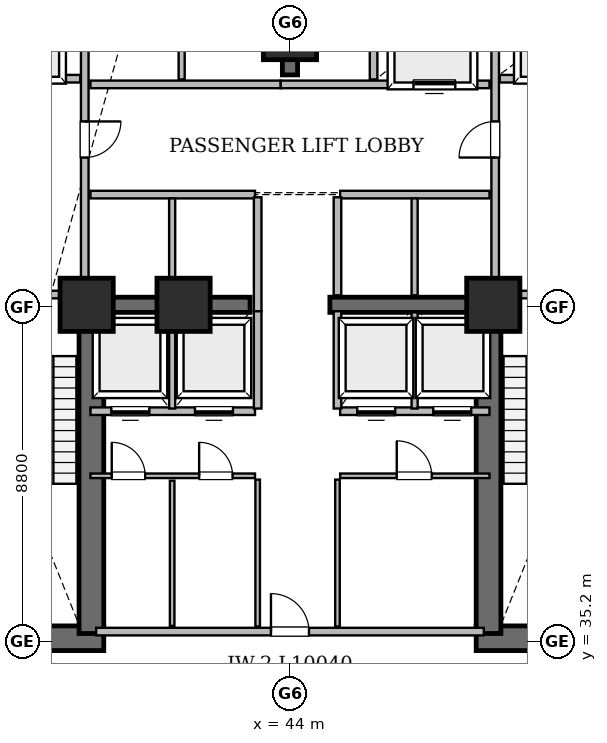
"""IFC4 building model, lengths in metres.
Left out: names, types, materials, properties, quantities, classifications, styles, units other than length and angle.
Written with IfcOpenShell. Run it as: python <this file> out.ifc"""

import sys

from ifc_helpers import new_model, si_unit, direction, frame, frame_2d, origin, origin_2d, place, context, subcontext, project, spatial, rectangle, extrude, element, fill, save


model = new_model("IFC4")
c1 = context("Model", 3, precision=1e-05, world=origin(), true_north=direction((0.0, 1.0)))
c2 = subcontext(c1, "Body", "Model", "MODEL_VIEW")
j1 = project(units=[si_unit("LENGTHUNIT", "METRE"), si_unit("PLANEANGLEUNIT", "RADIAN")], contexts=[c1])
p1 = place(None, origin())
s1 = spatial("IfcSite", under=j1, at=p1, CompositionType="ELEMENT")
p2 = place(p1, origin())
s2 = spatial("IfcBuilding", under=s1, at=p2, CompositionType="ELEMENT")
p3 = place(p2, frame((0.0, 0.0, 4.8)))
s3 = spatial("IfcBuildingStorey", under=s2, at=p3, CompositionType="ELEMENT", Elevation=4.8)
for number, where, z_axis, x_axis in (
    (1, (34.95, 35.275, 0.0), (0.0, 0.0, 1.0), (1.0, 0.0, 0.0)),
    (2, (48.9, 35.275, 0.0), (0.0, 0.0, 1.0), (1.0, 0.0, 0.0)),
):
    element("IfcWall", number, at=place(p3, frame(where, z_axis=z_axis, x_axis=x_axis)), inside=s3, PredefinedType="SHEAR", context=c2, shape_type="SweptSolid", body=[
        extrude(rectangle(XDim=4.15, YDim=0.65, at=frame_2d((2.075, 0.0))), origin(), (0.0, 0.0, 1.0), 4.5),
    ])
for number, where, z_axis, x_axis in (
    (3, (38.775, 35.4, 0.0), (0.0, 0.0, 1.0), (0.0, 1.0, 0.0)),
    (4, (49.225, 35.4, 0.0), (0.0, 0.0, 1.0), (0.0, 1.0, 0.0)),
):
    element("IfcWall", number, at=place(p3, frame(where, z_axis=z_axis, x_axis=x_axis)), inside=s3, PredefinedType="SHEAR", context=c2, shape_type="SweptSolid", body=[
        extrude(rectangle(XDim=8.95, YDim=0.65, at=frame_2d((4.475, 0.0))), origin(), (0.0, 0.0, 1.0), 4.5),
    ])
p4 = place(p3, frame((44.0, 50.1, 0.0), z_axis=(0.0, 0.0, 1.0), x_axis=(0.0, 1.0, 0.0)))
e5 = element("IfcWall", 5, at=p4, inside=s3, PredefinedType="SHEAR", context=c2, shape_type="SweptSolid", body=[
    extrude(rectangle(XDim=2.1, YDim=0.4, at=frame_2d((1.05, 0.0))), origin(), (0.0, 0.0, 1.0), 4.5),
])
for number, where, z_axis, x_axis in (
    (6, (38.75, 44.05, 0.0), (0.0, 0.0, 1.0), (1.0, 0.0, 0.0)),
    (7, (45.05, 44.05, 0.0), (0.0, 0.0, 1.0), (1.0, 0.0, 0.0)),
):
    element("IfcWall", number, at=place(p3, frame(where, z_axis=z_axis, x_axis=x_axis)), inside=s3, PredefinedType="SHEAR", context=c2, shape_type="SweptSolid", body=[
        extrude(rectangle(XDim=4.2, YDim=0.4, at=frame_2d((2.1, 0.0))), origin(), (0.0, 0.0, 1.0), 4.5),
    ])
for number, where, z_axis, x_axis in (
    (8, (38.65, 44.05, 0.0), (0.0, 0.0, 1.0), (1.0, 0.0, 0.0)),
    (9, (49.35, 44.05, 0.0), (0.0, 0.0, 1.0), (1.0, 0.0, 0.0)),
    (10, (44.0, 51.2, 0.0), (0.0, 0.0, 1.0), (1.0, 0.0, 0.0)),
    (11, (41.2, 44.05, 0.0), (0.0, 0.0, 1.0), (1.0, 0.0, 0.0)),
):
    element("IfcColumn", number, at=place(p3, frame(where, z_axis=z_axis, x_axis=x_axis)), inside=s3, PredefinedType="COLUMN", context=c2, shape_type="SweptSolid", body=[
        extrude(rectangle(XDim=1.4, YDim=1.4, at=origin_2d()), origin(), (0.0, 0.0, 1.0), 4.8),
    ])
p5 = place(p3, frame((38.9, 35.45, 0.0), z_axis=(0.0, 0.0, 1.0), x_axis=(1.0, 0.0, 0.0)))
e12 = element("IfcWall", 12, at=p5, inside=s3, PredefinedType="SOLIDWALL", context=c2, shape_type="SweptSolid", body=[
    extrude(rectangle(XDim=10.2, YDim=0.2, at=frame_2d((5.1, 0.0))), origin(), (0.0, 0.0, 1.0), 4.5),
])
p6 = place(p5, frame((4.6, 0.0, 0.0)))
e13 = element("IfcOpeningElement", 13, at=p6, cuts=e12, PredefinedType="OPENING", context=c2, shape_type="SweptSolid", body=[
    extrude(rectangle(XDim=1.0, YDim=2.15, at=frame_2d((0.5, 1.075))), frame((0.0, 0.11, 0.0), z_axis=(0.0, -1.0, 0.0), x_axis=(1.0, 0.0, 0.0)), (0.0, 0.0, 1.0), 0.22),
])
p7 = place(p3, frame((38.6, 44.5, 0.0), z_axis=(0.0, 0.0, 1.0), x_axis=(0.0, 1.0, 0.0)))
e14 = element("IfcWall", 14, at=p7, inside=s3, PredefinedType="SOLIDWALL", context=c2, shape_type="SweptSolid", body=[
    extrude(rectangle(XDim=7.92, YDim=0.2, at=frame_2d((3.96, 0.0))), origin(), (0.0, 0.0, 1.0), 4.5),
])
p8 = place(p7, frame((3.425, 0.0, 0.0)))
e15 = element("IfcOpeningElement", 15, at=p8, cuts=e14, PredefinedType="OPENING", context=c2, shape_type="SweptSolid", body=[
    extrude(rectangle(XDim=0.95, YDim=2.15, at=frame_2d((0.475, 1.075))), frame((0.0, 0.11, 0.0), z_axis=(0.0, -1.0, 0.0), x_axis=(1.0, 0.0, 0.0)), (0.0, 0.0, 1.0), 0.22),
])
p9 = place(p3, frame((49.4, 44.5, 0.0), z_axis=(0.0, 0.0, 1.0), x_axis=(0.0, 1.0, 0.0)))
e16 = element("IfcWall", 16, at=p9, inside=s3, PredefinedType="SOLIDWALL", context=c2, shape_type="SweptSolid", body=[
    extrude(rectangle(XDim=7.92, YDim=0.2, at=frame_2d((3.96, 0.0))), origin(), (0.0, 0.0, 1.0), 3.588),
])
p10 = place(p9, frame((3.425, 0.0, 0.0)))
e17 = element("IfcOpeningElement", 17, at=p10, cuts=e16, PredefinedType="OPENING", context=c2, shape_type="SweptSolid", body=[
    extrude(rectangle(XDim=0.95, YDim=2.15, at=frame_2d((0.475, 1.075))), frame((0.0, 0.11, 0.0), z_axis=(0.0, -1.0, 0.0), x_axis=(1.0, 0.0, 0.0)), (0.0, 0.0, 1.0), 0.22),
])
p11 = place(p3, frame((43.75, 49.85, 0.0), z_axis=(0.0, 0.0, 1.0), x_axis=(1.0, 0.0, 0.0)))
e18 = element("IfcWall", 18, at=p11, inside=s3, PredefinedType="SOLIDWALL", context=c2, shape_type="SweptSolid", body=[
    extrude(rectangle(XDim=5.5, YDim=0.2, at=frame_2d((2.75, 0.0))), origin(), (0.0, 0.0, 1.0), 3.588),
])
p12 = place(p11, frame((3.5, 0.0, 0.0)))
e19 = element("IfcOpeningElement", 19, at=p12, cuts=e18, PredefinedType="OPENING", context=c2, shape_type="SweptSolid", body=[
    extrude(rectangle(XDim=1.1, YDim=2.15, at=frame_2d((0.55, 1.075))), frame((0.0, 0.11, 0.0), z_axis=(0.0, -1.0, 0.0), x_axis=(1.0, 0.0, 0.0)), (0.0, 0.0, 1.0), 0.22),
])
p13 = place(p3, frame((38.75, 41.25, 0.0), z_axis=(0.0, 0.0, 1.0), x_axis=(1.0, 0.0, 0.0)))
e20 = element("IfcWall", 20, at=p13, inside=s3, PredefinedType="SOLIDWALL", context=c2, shape_type="SweptSolid", body=[
    extrude(rectangle(XDim=4.33, YDim=0.2, at=frame_2d((2.165, 0.0))), origin(), (0.0, 0.0, 1.0), 4.5),
])
p14 = place(p13, frame((0.55, 0.0, 0.0)))
e21 = element("IfcOpeningElement", 21, at=p14, cuts=e20, PredefinedType="OPENING", context=c2, shape_type="SweptSolid", body=[
    extrude(rectangle(XDim=1.0, YDim=2.15, at=frame_2d((0.5, 1.075))), frame((0.0, 0.11, 0.0), z_axis=(0.0, -1.0, 0.0), x_axis=(1.0, 0.0, 0.0)), (0.0, 0.0, 1.0), 0.22),
])
p15 = place(p13, frame((2.75, 0.0, 0.0)))
e22 = element("IfcOpeningElement", 22, at=p15, cuts=e20, PredefinedType="OPENING", context=c2, shape_type="SweptSolid", body=[
    extrude(rectangle(XDim=1.0, YDim=2.15, at=frame_2d((0.5, 1.075))), frame((0.0, 0.11, 0.0), z_axis=(0.0, -1.0, 0.0), x_axis=(1.0, 0.0, 0.0)), (0.0, 0.0, 1.0), 0.22),
])
p16 = place(p3, frame((38.75, 39.55, 0.0), z_axis=(0.0, 0.0, 1.0), x_axis=(1.0, 0.0, 0.0)))
e23 = element("IfcWall", 23, at=p16, inside=s3, PredefinedType="PARTITIONING", context=c2, shape_type="SweptSolid", body=[
    extrude(rectangle(XDim=4.33, YDim=0.12, at=frame_2d((2.165, 0.0))), origin(), (0.0, 0.0, 1.0), 4.5),
])
p17 = place(p16, frame((0.56, 0.0, 0.0)))
e24 = element("IfcOpeningElement", 24, at=p17, cuts=e23, PredefinedType="OPENING", context=c2, shape_type="SweptSolid", body=[
    extrude(rectangle(XDim=0.88, YDim=2.1, at=frame_2d((0.44, 1.05))), frame((0.0, 0.07, 0.0), z_axis=(0.0, -1.0, 0.0), x_axis=(1.0, 0.0, 0.0)), (0.0, 0.0, 1.0), 0.14),
])
p18 = place(p16, frame((2.86, 0.0, 0.0)))
e25 = element("IfcOpeningElement", 25, at=p18, cuts=e23, PredefinedType="OPENING", context=c2, shape_type="SweptSolid", body=[
    extrude(rectangle(XDim=0.88, YDim=2.1, at=frame_2d((0.44, 1.05))), frame((0.0, 0.07, 0.0), z_axis=(0.0, -1.0, 0.0), x_axis=(1.0, 0.0, 0.0)), (0.0, 0.0, 1.0), 0.14),
])
p19 = place(p3, frame((45.32, 41.25, 0.0), z_axis=(0.0, 0.0, 1.0), x_axis=(1.0, 0.0, 0.0)))
e26 = element("IfcWall", 26, at=p19, inside=s3, PredefinedType="SOLIDWALL", context=c2, shape_type="SweptSolid", body=[
    extrude(rectangle(XDim=3.93, YDim=0.2, at=frame_2d((1.965, 0.0))), origin(), (0.0, 0.0, 1.0), 4.5),
])
p20 = place(p19, frame((0.45, 0.0, 0.0)))
e27 = element("IfcOpeningElement", 27, at=p20, cuts=e26, PredefinedType="OPENING", context=c2, shape_type="SweptSolid", body=[
    extrude(rectangle(XDim=1.0, YDim=2.15, at=frame_2d((0.5, 1.075))), frame((0.0, 0.11, 0.0), z_axis=(0.0, -1.0, 0.0), x_axis=(1.0, 0.0, 0.0)), (0.0, 0.0, 1.0), 0.22),
])
p21 = place(p19, frame((2.45, 0.0, 0.0)))
e28 = element("IfcOpeningElement", 28, at=p21, cuts=e26, PredefinedType="OPENING", context=c2, shape_type="SweptSolid", body=[
    extrude(rectangle(XDim=1.0, YDim=2.15, at=frame_2d((0.5, 1.075))), frame((0.0, 0.11, 0.0), z_axis=(0.0, -1.0, 0.0), x_axis=(1.0, 0.0, 0.0)), (0.0, 0.0, 1.0), 0.22),
])
p22 = place(p3, frame((45.32, 39.55, 0.0), z_axis=(0.0, 0.0, 1.0), x_axis=(1.0, 0.0, 0.0)))
e29 = element("IfcWall", 29, at=p22, inside=s3, PredefinedType="PARTITIONING", context=c2, shape_type="SweptSolid", body=[
    extrude(rectangle(XDim=3.93, YDim=0.12, at=frame_2d((1.965, 0.0))), origin(), (0.0, 0.0, 1.0), 4.5),
])
p23 = place(p22, frame((1.49, 0.0, 0.0)))
e30 = element("IfcOpeningElement", 30, at=p23, cuts=e29, PredefinedType="OPENING", context=c2, shape_type="SweptSolid", body=[
    extrude(rectangle(XDim=0.92, YDim=2.1, at=frame_2d((0.46, 1.05))), frame((0.0, 0.07, 0.0), z_axis=(0.0, -1.0, 0.0), x_axis=(1.0, 0.0, 0.0)), (0.0, 0.0, 1.0), 0.14),
])
p24 = place(p3, frame((35.65, 44.32, 0.0), z_axis=(0.0, 0.0, 1.0), x_axis=(1.0, 0.0, 0.0)))
e31 = element("IfcWall", 31, at=p24, inside=s3, PredefinedType="SOLIDWALL", context=c2, shape_type="SweptSolid", body=[
    extrude(rectangle(XDim=2.8, YDim=0.2, at=frame_2d((1.4, 0.0))), origin(), (0.0, 0.0, 1.0), 4.5),
])
p25 = place(p24, frame((0.9, 0.0, 0.0)))
e32 = element("IfcOpeningElement", 32, at=p25, cuts=e31, PredefinedType="OPENING", context=c2, shape_type="SweptSolid", body=[
    extrude(rectangle(XDim=1.0, YDim=2.15, at=frame_2d((0.5, 1.075))), frame((0.0, 0.11, 0.0), z_axis=(0.0, -1.0, 0.0), x_axis=(1.0, 0.0, 0.0)), (0.0, 0.0, 1.0), 0.22),
])
p26 = place(p3, frame((49.55, 44.32, 0.0), z_axis=(0.0, 0.0, 1.0), x_axis=(1.0, 0.0, 0.0)))
e33 = element("IfcWall", 33, at=p26, inside=s3, PredefinedType="SOLIDWALL", context=c2, shape_type="SweptSolid", body=[
    extrude(rectangle(XDim=2.8, YDim=0.2, at=frame_2d((1.4, 0.0))), origin(), (0.0, 0.0, 1.0), 3.588),
])
p27 = place(p26, frame((0.9, 0.0, 0.0)))
e34 = element("IfcOpeningElement", 34, at=p27, cuts=e33, PredefinedType="OPENING", context=c2, shape_type="SweptSolid", body=[
    extrude(rectangle(XDim=1.0, YDim=2.15, at=frame_2d((0.5, 1.075))), frame((0.0, 0.11, 0.0), z_axis=(0.0, -1.0, 0.0), x_axis=(1.0, 0.0, 0.0)), (0.0, 0.0, 1.0), 0.22),
])
p28 = place(p3, frame((35.68, 50.0, 0.0), z_axis=(0.0, 0.0, 1.0), x_axis=(1.0, 0.0, 0.0)))
e35 = element("IfcWall", 35, at=p28, inside=s3, PredefinedType="SOLIDWALL", context=c2, shape_type="SweptSolid", body=[
    extrude(rectangle(XDim=2.8, YDim=0.2, at=frame_2d((1.4, 0.0))), origin(), (0.0, 0.0, 1.0), 4.5),
])
p29 = place(p28, frame((0.85, 0.0, 0.0)))
e36 = element("IfcOpeningElement", 36, at=p29, cuts=e35, PredefinedType="OPENING", context=c2, shape_type="SweptSolid", body=[
    extrude(rectangle(XDim=1.1, YDim=2.15, at=frame_2d((0.55, 1.075))), frame((0.0, 0.11, 0.0), z_axis=(0.0, -1.0, 0.0), x_axis=(1.0, 0.0, 0.0)), (0.0, 0.0, 1.0), 0.22),
])
p30 = place(p3, frame((49.52, 50.0, 0.0), z_axis=(0.0, 0.0, 1.0), x_axis=(1.0, 0.0, 0.0)))
e37 = element("IfcWall", 37, at=p30, inside=s3, PredefinedType="SOLIDWALL", context=c2, shape_type="SweptSolid", body=[
    extrude(rectangle(XDim=2.8, YDim=0.2, at=frame_2d((1.4, 0.0))), origin(), (0.0, 0.0, 1.0), 4.5),
])
p31 = place(p30, frame((0.85, 0.0, 0.0)))
e38 = element("IfcOpeningElement", 38, at=p31, cuts=e37, PredefinedType="OPENING", context=c2, shape_type="SweptSolid", body=[
    extrude(rectangle(XDim=1.1, YDim=2.15, at=frame_2d((0.55, 1.075))), frame((0.0, 0.11, 0.0), z_axis=(0.0, -1.0, 0.0), x_axis=(1.0, 0.0, 0.0)), (0.0, 0.0, 1.0), 0.22),
])
p32 = place(p3, frame((38.75, 49.85, 0.0), z_axis=(0.0, 0.0, 1.0), x_axis=(1.0, 0.0, 0.0)))
e39 = element("IfcWall", 39, at=p32, inside=s3, PredefinedType="SOLIDWALL", context=c2, shape_type="SweptSolid", body=[
    extrude(rectangle(XDim=5.0, YDim=0.2, at=frame_2d((2.5, 0.0))), origin(), (0.0, 0.0, 1.0), 4.5),
])
p33 = place(p3, frame((38.75, 46.95, 0.0), z_axis=(0.0, 0.0, 1.0), x_axis=(1.0, 0.0, 0.0)))
e40 = element("IfcWall", 40, at=p33, inside=s3, PredefinedType="SOLIDWALL", context=c2, shape_type="SweptSolid", body=[
    extrude(rectangle(XDim=4.33, YDim=0.2, at=frame_2d((2.165, 0.0))), origin(), (0.0, 0.0, 1.0), 4.5),
])
p34 = place(p3, frame((45.32, 46.95, 0.0), z_axis=(0.0, 0.0, 1.0), x_axis=(1.0, 0.0, 0.0)))
e41 = element("IfcWall", 41, at=p34, inside=s3, PredefinedType="SOLIDWALL", context=c2, shape_type="SweptSolid", body=[
    extrude(rectangle(XDim=3.93, YDim=0.2, at=frame_2d((1.965, 0.0))), origin(), (0.0, 0.0, 1.0), 3.588),
])
for number, where, z_axis, x_axis in (
    (42, (43.15, 35.58, 0.0), (0.0, 0.0, 1.0), (0.0, 1.0, 0.0)),
    (43, (45.25, 35.58, 0.0), (0.0, 0.0, 1.0), (0.0, 1.0, 0.0)),
):
    element("IfcWall", number, at=place(p3, frame(where, z_axis=z_axis, x_axis=x_axis)), inside=s3, PredefinedType="PARTITIONING", context=c2, shape_type="SweptSolid", body=[
        extrude(rectangle(XDim=3.87, YDim=0.12, at=frame_2d((1.935, 0.0))), origin(), (0.0, 0.0, 1.0), 4.5),
    ])
p35 = place(p3, frame((40.9, 35.6, 0.0), z_axis=(0.0, 0.0, 1.0), x_axis=(0.0, 1.0, 0.0)))
e44 = element("IfcWall", 44, at=p35, inside=s3, PredefinedType="PARTITIONING", context=c2, shape_type="SweptSolid", body=[
    extrude(rectangle(XDim=3.82, YDim=0.12, at=frame_2d((1.91, 0.0))), origin(), (0.0, 0.0, 1.0), 4.5),
])
p36 = place(p3, frame((43.15, 43.88, 0.0), z_axis=(0.0, 0.0, 1.0), x_axis=(0.0, 1.0, 0.0)))
e45 = element("IfcWall", 45, at=p36, inside=s3, PredefinedType="SOLIDWALL", context=c2, shape_type="SweptSolid", body=[
    extrude(rectangle(XDim=3.0, YDim=0.2, at=frame_2d((1.5, 0.0))), origin(), (0.0, 0.0, 1.0), 4.5),
])
p37 = place(p3, frame((45.25, 44.3, 0.0), z_axis=(0.0, 0.0, 1.0), x_axis=(0.0, 1.0, 0.0)))
e46 = element("IfcWall", 46, at=p37, inside=s3, PredefinedType="SOLIDWALL", context=c2, shape_type="SweptSolid", body=[
    extrude(rectangle(XDim=2.58, YDim=0.2, at=frame_2d((1.29, 0.0))), origin(), (0.0, 0.0, 1.0), 4.5),
])
for number, where, z_axis, x_axis in (
    (47, (43.15, 41.32, 0.0), (0.0, 0.0, 1.0), (0.0, 1.0, 0.0)),
    (48, (45.25, 41.32, 0.0), (0.0, 0.0, 1.0), (0.0, 1.0, 0.0)),
):
    element("IfcWall", number, at=place(p3, frame(where, z_axis=z_axis, x_axis=x_axis)), inside=s3, PredefinedType="SOLIDWALL", context=c2, shape_type="SweptSolid", body=[
        extrude(rectangle(XDim=2.56, YDim=0.2, at=frame_2d((1.28, 0.0))), origin(), (0.0, 0.0, 1.0), 4.5),
    ])
p38 = place(p3, frame((40.9, 44.3, 0.0), z_axis=(0.0, 0.0, 1.0), x_axis=(0.0, 1.0, 0.0)))
e49 = element("IfcWall", 49, at=p38, inside=s3, PredefinedType="SOLIDWALL", context=c2, shape_type="SweptSolid", body=[
    extrude(rectangle(XDim=2.55, YDim=0.16, at=frame_2d((1.275, 0.0))), origin(), (0.0, 0.0, 1.0), 4.5),
])
p39 = place(p3, frame((47.28, 44.3, 0.0), z_axis=(0.0, 0.0, 1.0), x_axis=(0.0, 1.0, 0.0)))
e50 = element("IfcWall", 50, at=p39, inside=s3, PredefinedType="SOLIDWALL", context=c2, shape_type="SweptSolid", body=[
    extrude(rectangle(XDim=2.55, YDim=0.16, at=frame_2d((1.275, 0.0))), origin(), (0.0, 0.0, 1.0), 3.588),
])
for number, where, z_axis, x_axis in (
    (51, (40.9, 41.32, 0.0), (0.0, 0.0, 1.0), (0.0, 1.0, 0.0)),
    (52, (47.28, 41.32, 0.0), (0.0, 0.0, 1.0), (0.0, 1.0, 0.0)),
):
    element("IfcWall", number, at=place(p3, frame(where, z_axis=z_axis, x_axis=x_axis)), inside=s3, PredefinedType="SOLIDWALL", context=c2, shape_type="SweptSolid", body=[
        extrude(rectangle(XDim=2.53, YDim=0.16, at=frame_2d((1.265, 0.0))), origin(), (0.0, 0.0, 1.0), 4.5),
    ])
p40 = place(p3, frame((41.15, 49.98, 0.0), z_axis=(0.0, 0.0, 1.0), x_axis=(0.0, 1.0, 0.0)))
e53 = element("IfcWall", 53, at=p40, inside=s3, PredefinedType="SOLIDWALL", context=c2, shape_type="SweptSolid", body=[
    extrude(rectangle(XDim=2.37, YDim=0.16, at=frame_2d((1.185, 0.0))), origin(), (0.0, 0.0, 1.0), 4.5),
])
p41 = place(p3, frame((46.2, 49.98, 0.0), z_axis=(0.0, 0.0, 1.0), x_axis=(0.0, 1.0, 0.0)))
e54 = element("IfcWall", 54, at=p41, inside=s3, PredefinedType="SOLIDWALL", context=c2, shape_type="SweptSolid", body=[
    extrude(rectangle(XDim=2.37, YDim=0.2, at=frame_2d((1.185, 0.0))), origin(), (0.0, 0.0, 1.0), 4.5),
])
p42 = place(p8, frame((0.95, 0.0, 0.0), z_axis=(0.0, 0.0, 1.0), x_axis=(-1.0, 0.0, 0.0)))
e55 = element("IfcDoor", 55, at=p42, inside=s3, OperationType="SINGLE_SWING_RIGHT", PredefinedType="DOOR", context=c2, shape_type="SweptSolid", body=[
    extrude(rectangle(XDim=0.95, YDim=2.15, at=frame_2d((0.475, 1.075))), frame((0.0, 0.025, 0.0), z_axis=(0.0, -1.0, 0.0), x_axis=(1.0, 0.0, 0.0)), (0.0, 0.0, 1.0), 0.05),
])
fill(e15, e55)
p43 = place(p10, origin())
e56 = element("IfcDoor", 56, at=p43, inside=s3, OperationType="SINGLE_SWING_LEFT", PredefinedType="DOOR", context=c2, shape_type="SweptSolid", body=[
    extrude(rectangle(XDim=0.95, YDim=2.15, at=frame_2d((0.475, 1.075))), frame((0.0, 0.025, 0.0), z_axis=(0.0, -1.0, 0.0), x_axis=(1.0, 0.0, 0.0)), (0.0, 0.0, 1.0), 0.05),
])
fill(e17, e56)
p44 = place(p6, origin())
e57 = element("IfcDoor", 57, at=p44, inside=s3, OperationType="SINGLE_SWING_LEFT", PredefinedType="DOOR", context=c2, shape_type="SweptSolid", body=[
    extrude(rectangle(XDim=1.0, YDim=2.15, at=frame_2d((0.5, 1.075))), frame((0.0, 0.025, 0.0), z_axis=(0.0, -1.0, 0.0), x_axis=(1.0, 0.0, 0.0)), (0.0, 0.0, 1.0), 0.05),
])
fill(e13, e57)
p45 = place(p12, origin())
e58 = element("IfcDoor", 58, at=p45, inside=s3, OperationType="SLIDING_TO_LEFT", PredefinedType="DOOR", context=c2, shape_type="SweptSolid", body=[
    extrude(rectangle(XDim=1.1, YDim=2.15, at=frame_2d((0.55, 1.075))), frame((0.0, 0.025, 0.0), z_axis=(0.0, -1.0, 0.0), x_axis=(1.0, 0.0, 0.0)), (0.0, 0.0, 1.0), 0.05),
])
fill(e19, e58)
p46 = place(p14, frame((1.0, 0.0, 0.0), z_axis=(0.0, 0.0, 1.0), x_axis=(-1.0, 0.0, 0.0)))
e59 = element("IfcDoor", 59, at=p46, inside=s3, OperationType="SLIDING_TO_LEFT", PredefinedType="DOOR", context=c2, shape_type="SweptSolid", body=[
    extrude(rectangle(XDim=1.0, YDim=2.15, at=frame_2d((0.5, 1.075))), frame((0.0, 0.025, 0.0), z_axis=(0.0, -1.0, 0.0), x_axis=(1.0, 0.0, 0.0)), (0.0, 0.0, 1.0), 0.05),
])
fill(e21, e59)
p47 = place(p15, frame((1.0, 0.0, 0.0), z_axis=(0.0, 0.0, 1.0), x_axis=(-1.0, 0.0, 0.0)))
e60 = element("IfcDoor", 60, at=p47, inside=s3, OperationType="SLIDING_TO_LEFT", PredefinedType="DOOR", context=c2, shape_type="SweptSolid", body=[
    extrude(rectangle(XDim=1.0, YDim=2.15, at=frame_2d((0.5, 1.075))), frame((0.0, 0.025, 0.0), z_axis=(0.0, -1.0, 0.0), x_axis=(1.0, 0.0, 0.0)), (0.0, 0.0, 1.0), 0.05),
])
fill(e22, e60)
p48 = place(p20, frame((1.0, 0.0, 0.0), z_axis=(0.0, 0.0, 1.0), x_axis=(-1.0, 0.0, 0.0)))
e61 = element("IfcDoor", 61, at=p48, inside=s3, OperationType="SLIDING_TO_LEFT", PredefinedType="DOOR", context=c2, shape_type="SweptSolid", body=[
    extrude(rectangle(XDim=1.0, YDim=2.15, at=frame_2d((0.5, 1.075))), frame((0.0, 0.025, 0.0), z_axis=(0.0, -1.0, 0.0), x_axis=(1.0, 0.0, 0.0)), (0.0, 0.0, 1.0), 0.05),
])
fill(e27, e61)
p49 = place(p21, frame((1.0, 0.0, 0.0), z_axis=(0.0, 0.0, 1.0), x_axis=(-1.0, 0.0, 0.0)))
e62 = element("IfcDoor", 62, at=p49, inside=s3, OperationType="SLIDING_TO_LEFT", PredefinedType="DOOR", context=c2, shape_type="SweptSolid", body=[
    extrude(rectangle(XDim=1.0, YDim=2.15, at=frame_2d((0.5, 1.075))), frame((0.0, 0.025, 0.0), z_axis=(0.0, -1.0, 0.0), x_axis=(1.0, 0.0, 0.0)), (0.0, 0.0, 1.0), 0.05),
])
fill(e28, e62)
p50 = place(p17, origin())
e63 = element("IfcDoor", 63, at=p50, inside=s3, OperationType="SINGLE_SWING_LEFT", PredefinedType="DOOR", context=c2, shape_type="SweptSolid", body=[
    extrude(rectangle(XDim=0.88, YDim=2.1, at=frame_2d((0.44, 1.05))), frame((0.0, 0.025, 0.0), z_axis=(0.0, -1.0, 0.0), x_axis=(1.0, 0.0, 0.0)), (0.0, 0.0, 1.0), 0.05),
])
fill(e24, e63)
p51 = place(p18, origin())
e64 = element("IfcDoor", 64, at=p51, inside=s3, OperationType="SINGLE_SWING_LEFT", PredefinedType="DOOR", context=c2, shape_type="SweptSolid", body=[
    extrude(rectangle(XDim=0.88, YDim=2.1, at=frame_2d((0.44, 1.05))), frame((0.0, 0.025, 0.0), z_axis=(0.0, -1.0, 0.0), x_axis=(1.0, 0.0, 0.0)), (0.0, 0.0, 1.0), 0.05),
])
fill(e25, e64)
p52 = place(p23, origin())
e65 = element("IfcDoor", 65, at=p52, inside=s3, OperationType="SINGLE_SWING_LEFT", PredefinedType="DOOR", context=c2, shape_type="SweptSolid", body=[
    extrude(rectangle(XDim=0.92, YDim=2.1, at=frame_2d((0.46, 1.05))), frame((0.0, 0.025, 0.0), z_axis=(0.0, -1.0, 0.0), x_axis=(1.0, 0.0, 0.0)), (0.0, 0.0, 1.0), 0.05),
])
fill(e30, e65)
save(model, sys.argv[1])
